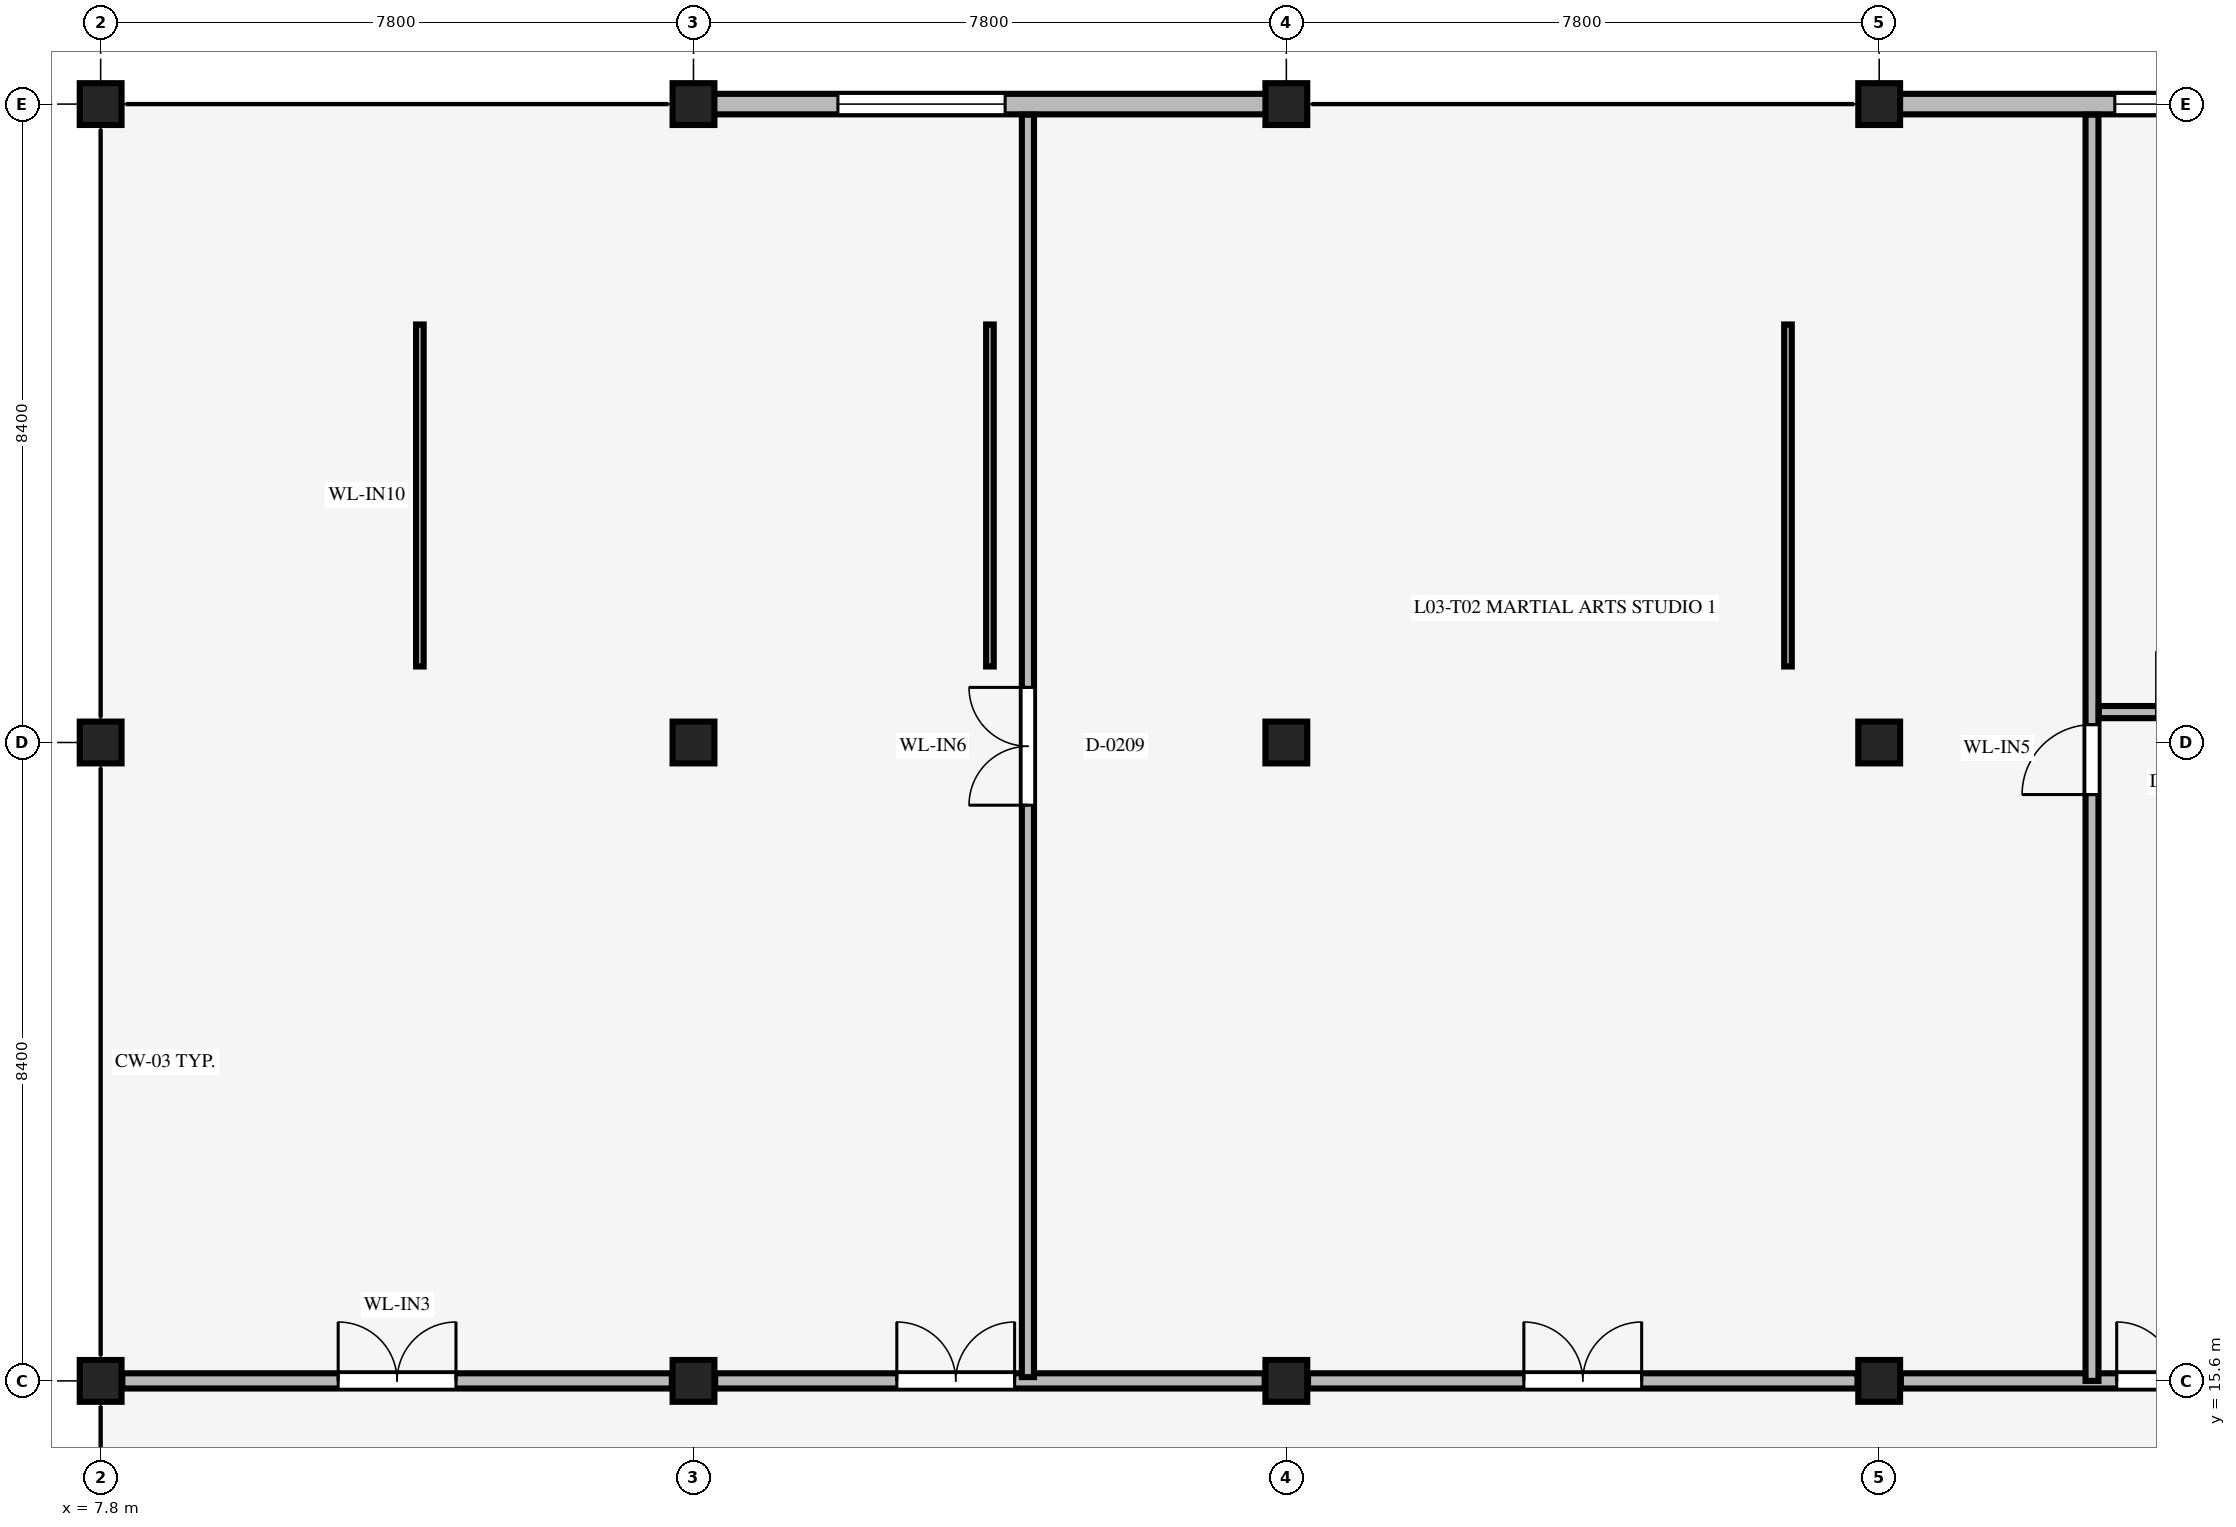
"""IFC4 building model, lengths in metres.
Left out: names, types, materials, properties, quantities, classifications, styles, units other than length and angle.
Written with IfcOpenShell. Run it as: python <this file> out.ifc"""

import sys

from ifc_helpers import new_model, si_unit, direction, frame, frame_2d, origin, origin_2d, place, context, subcontext, project, spatial, rectangle, extrude, element, fill, save


model = new_model("IFC4")
c1 = context("Model", 3, precision=1e-05, world=origin(), true_north=direction((0.0, 1.0)))
c2 = subcontext(c1, "Body", "Model", "MODEL_VIEW")
j1 = project(units=[si_unit("LENGTHUNIT", "METRE"), si_unit("PLANEANGLEUNIT", "RADIAN")], contexts=[c1])
p1 = place(None, origin())
s1 = spatial("IfcSite", under=j1, at=p1, CompositionType="ELEMENT")
p2 = place(p1, origin())
s2 = spatial("IfcBuilding", under=s1, at=p2, CompositionType="ELEMENT")
p3 = place(p2, frame((0.0, 0.0, 15.9)))
s3 = spatial("IfcBuildingStorey", under=s2, at=p3, CompositionType="ELEMENT", Elevation=15.9)
for number, where, z_axis, x_axis in (
    (1, (7.8, 15.6, 0.0), (0.0, 0.0, 1.0), (1.0, 0.0, 0.0)),
    (2, (7.8, 24.0, 0.0), (0.0, 0.0, 1.0), (1.0, 0.0, 0.0)),
    (3, (7.8, 32.4, 0.0), (0.0, 0.0, 1.0), (1.0, 0.0, 0.0)),
    (4, (15.6, 15.6, 0.0), (0.0, 0.0, 1.0), (1.0, 0.0, 0.0)),
    (5, (15.6, 24.0, 0.0), (0.0, 0.0, 1.0), (1.0, 0.0, 0.0)),
    (6, (15.6, 32.4, 0.0), (0.0, 0.0, 1.0), (1.0, 0.0, 0.0)),
    (7, (23.4, 15.6, 0.0), (0.0, 0.0, 1.0), (1.0, 0.0, 0.0)),
    (8, (23.4, 24.0, 0.0), (0.0, 0.0, 1.0), (1.0, 0.0, 0.0)),
    (9, (23.4, 32.4, 0.0), (0.0, 0.0, 1.0), (1.0, 0.0, 0.0)),
    (10, (31.2, 15.6, 0.0), (0.0, 0.0, 1.0), (1.0, 0.0, 0.0)),
    (11, (31.2, 24.0, 0.0), (0.0, 0.0, 1.0), (1.0, 0.0, 0.0)),
    (12, (31.2, 32.4, 0.0), (0.0, 0.0, 1.0), (1.0, 0.0, 0.0)),
):
    element("IfcColumn", number, at=place(p3, frame(where, z_axis=z_axis, x_axis=x_axis)), inside=s3, PredefinedType="COLUMN", context=c2, shape_type="SweptSolid", body=[
        extrude(rectangle(XDim=0.55, YDim=0.55, at=origin_2d()), origin(), (0.0, 0.0, 1.0), 3.9),
    ])
p4 = place(p3, frame((15.865, 32.4, 0.0), z_axis=(0.0, 0.0, 1.0), x_axis=(1.0, 0.0, 0.0)))
e13 = element("IfcWall", 13, at=p4, inside=s3, PredefinedType="STANDARD", context=c2, shape_type="SweptSolid", body=[
    extrude(rectangle(XDim=7.27, YDim=0.27, at=frame_2d((3.635, 0.0))), origin(), (0.0, 0.0, 1.0), 3.271),
])
p5 = place(p4, frame((1.635, 0.0, 0.95)))
e14 = element("IfcOpeningElement", 14, at=p5, cuts=e13, PredefinedType="OPENING", context=c2, shape_type="SweptSolid", body=[
    extrude(rectangle(XDim=2.2, YDim=1.9, at=frame_2d((1.1, 0.95))), frame((0.0, 0.145, 0.0), z_axis=(0.0, -1.0, 0.0), x_axis=(1.0, 0.0, 0.0)), (0.0, 0.0, 1.0), 0.29),
])
p6 = place(p3, frame((31.465, 32.4, 0.0), z_axis=(0.0, 0.0, 1.0), x_axis=(1.0, 0.0, 0.0)))
e15 = element("IfcWall", 15, at=p6, inside=s3, PredefinedType="STANDARD", context=c2, shape_type="SweptSolid", body=[
    extrude(rectangle(XDim=7.27, YDim=0.27, at=frame_2d((3.635, 0.0))), origin(), (0.0, 0.0, 1.0), 3.271),
])
p7 = place(p6, frame((2.835, 0.0, 0.95)))
e16 = element("IfcOpeningElement", 16, at=p7, cuts=e15, PredefinedType="OPENING", context=c2, shape_type="SweptSolid", body=[
    extrude(rectangle(XDim=2.2, YDim=1.9, at=frame_2d((1.1, 0.95))), frame((0.0, 0.145, 0.0), z_axis=(0.0, -1.0, 0.0), x_axis=(1.0, 0.0, 0.0)), (0.0, 0.0, 1.0), 0.29),
])
p8 = place(p3, frame((8.085, 15.6, 0.0), z_axis=(0.0, 0.0, 1.0), x_axis=(1.0, 0.0, 0.0)))
e17 = element("IfcWall", 17, at=p8, inside=s3, PredefinedType="STANDARD", context=c2, shape_type="SweptSolid", body=[
    extrude(rectangle(XDim=7.23, YDim=0.2, at=frame_2d((3.615, 0.0))), origin(), (0.0, 0.0, 1.0), 2.9),
])
p9 = place(p8, frame((2.84, 0.0, 0.0)))
e18 = element("IfcOpeningElement", 18, at=p9, cuts=e17, PredefinedType="OPENING", context=c2, shape_type="SweptSolid", body=[
    extrude(rectangle(XDim=1.55, YDim=2.25, at=frame_2d((0.775, 1.125))), frame((0.0, 0.11, 0.0), z_axis=(0.0, -1.0, 0.0), x_axis=(1.0, 0.0, 0.0)), (0.0, 0.0, 1.0), 0.22),
])
p10 = place(p3, frame((15.885, 15.6, 0.0), z_axis=(0.0, 0.0, 1.0), x_axis=(1.0, 0.0, 0.0)))
e19 = element("IfcWall", 19, at=p10, inside=s3, PredefinedType="STANDARD", context=c2, shape_type="SweptSolid", body=[
    extrude(rectangle(XDim=7.23, YDim=0.2, at=frame_2d((3.615, 0.0))), origin(), (0.0, 0.0, 1.0), 2.9),
])
p11 = place(p10, frame((2.39, 0.0, 0.0)))
e20 = element("IfcOpeningElement", 20, at=p11, cuts=e19, PredefinedType="OPENING", context=c2, shape_type="SweptSolid", body=[
    extrude(rectangle(XDim=1.55, YDim=2.25, at=frame_2d((0.775, 1.125))), frame((0.0, 0.11, 0.0), z_axis=(0.0, -1.0, 0.0), x_axis=(1.0, 0.0, 0.0)), (0.0, 0.0, 1.0), 0.22),
])
p12 = place(p3, frame((23.685, 15.6, 0.0), z_axis=(0.0, 0.0, 1.0), x_axis=(1.0, 0.0, 0.0)))
e21 = element("IfcWall", 21, at=p12, inside=s3, PredefinedType="STANDARD", context=c2, shape_type="SweptSolid", body=[
    extrude(rectangle(XDim=7.23, YDim=0.2, at=frame_2d((3.615, 0.0))), origin(), (0.0, 0.0, 1.0), 2.9),
])
p13 = place(p12, frame((2.84, 0.0, 0.0)))
e22 = element("IfcOpeningElement", 22, at=p13, cuts=e21, PredefinedType="OPENING", context=c2, shape_type="SweptSolid", body=[
    extrude(rectangle(XDim=1.55, YDim=2.25, at=frame_2d((0.775, 1.125))), frame((0.0, 0.11, 0.0), z_axis=(0.0, -1.0, 0.0), x_axis=(1.0, 0.0, 0.0)), (0.0, 0.0, 1.0), 0.22),
])
p14 = place(p3, frame((31.485, 15.6, 0.0), z_axis=(0.0, 0.0, 1.0), x_axis=(1.0, 0.0, 0.0)))
e23 = element("IfcWall", 23, at=p14, inside=s3, PredefinedType="STANDARD", context=c2, shape_type="SweptSolid", body=[
    extrude(rectangle(XDim=7.23, YDim=0.2, at=frame_2d((3.615, 0.0))), origin(), (0.0, 0.0, 1.0), 2.9),
])
p15 = place(p14, frame((2.84, 0.0, 0.0)))
e24 = element("IfcOpeningElement", 24, at=p15, cuts=e23, PredefinedType="OPENING", context=c2, shape_type="SweptSolid", body=[
    extrude(rectangle(XDim=1.55, YDim=2.25, at=frame_2d((0.775, 1.125))), frame((0.0, 0.11, 0.0), z_axis=(0.0, -1.0, 0.0), x_axis=(1.0, 0.0, 0.0)), (0.0, 0.0, 1.0), 0.22),
])
p16 = place(p3, frame((34.0, 15.6, 0.0), z_axis=(0.0, 0.0, 1.0), x_axis=(0.0, 1.0, 0.0)))
e25 = element("IfcWall", 25, at=p16, inside=s3, PredefinedType="STANDARD", context=c2, shape_type="SweptSolid", body=[
    extrude(rectangle(XDim=16.66, YDim=0.17, at=frame_2d((8.33, 0.0))), origin(), (0.0, 0.0, 1.0), 2.9),
])
p17 = place(p16, frame((7.715, 0.0, 0.0)))
e26 = element("IfcOpeningElement", 26, at=p17, cuts=e25, PredefinedType="OPENING", context=c2, shape_type="SweptSolid", body=[
    extrude(rectangle(XDim=0.92, YDim=2.15, at=frame_2d((0.46, 1.075))), frame((0.0, 0.095, 0.0), z_axis=(0.0, -1.0, 0.0), x_axis=(1.0, 0.0, 0.0)), (0.0, 0.0, 1.0), 0.19),
])
p18 = place(p3, frame((20.0, 15.65, 0.0), z_axis=(0.0, 0.0, 1.0), x_axis=(0.0, 1.0, 0.0)))
e27 = element("IfcWall", 27, at=p18, inside=s3, PredefinedType="STANDARD", context=c2, shape_type="SweptSolid", body=[
    extrude(rectangle(XDim=16.61, YDim=0.16, at=frame_2d((8.305, 0.0))), origin(), (0.0, 0.0, 1.0), 2.9),
])
p19 = place(p18, frame((7.525, 0.0, 0.0)))
e28 = element("IfcOpeningElement", 28, at=p19, cuts=e27, PredefinedType="OPENING", context=c2, shape_type="SweptSolid", body=[
    extrude(rectangle(XDim=1.55, YDim=2.25, at=frame_2d((0.775, 1.125))), frame((0.0, 0.09, 0.0), z_axis=(0.0, -1.0, 0.0), x_axis=(1.0, 0.0, 0.0)), (0.0, 0.0, 1.0), 0.18),
])
for number, where, z_axis, x_axis in (
    (29, (12.0, 25.0, 0.0), (0.0, 0.0, 1.0), (0.0, 1.0, 0.0)),
    (30, (19.5, 25.0, 0.0), (0.0, 0.0, 1.0), (0.0, 1.0, 0.0)),
    (31, (30.0, 25.0, 0.0), (0.0, 0.0, 1.0), (0.0, 1.0, 0.0)),
):
    element("IfcWall", number, at=place(p3, frame(where, z_axis=z_axis, x_axis=x_axis)), inside=s3, PredefinedType="STANDARD", context=c2, shape_type="SweptSolid", body=[
        extrude(rectangle(XDim=4.5, YDim=0.1, at=frame_2d((2.25, 0.0))), origin(), (0.0, 0.0, 1.0), 2.9),
    ])
p20 = place(p3, frame((34.09, 24.4, 0.0), z_axis=(0.0, 0.0, 1.0), x_axis=(1.0, 0.0, 0.0)))
e32 = element("IfcWall", 32, at=p20, inside=s3, PredefinedType="STANDARD", context=c2, shape_type="SweptSolid", body=[
    extrude(rectangle(XDim=23.91, YDim=0.16, at=frame_2d((11.955, 0.0))), origin(), (0.0, 0.0, 1.0), 2.9),
])
p21 = place(p20, frame((0.76, 0.0, 0.0)))
e33 = element("IfcOpeningElement", 33, at=p21, cuts=e32, PredefinedType="OPENING", context=c2, shape_type="SweptSolid", body=[
    extrude(rectangle(XDim=1.6, YDim=2.3, at=frame_2d((0.8, 1.15))), frame((0.0, 0.09, 0.0), z_axis=(0.0, -1.0, 0.0), x_axis=(1.0, 0.0, 0.0)), (0.0, 0.0, 1.0), 0.18),
])
p22 = place(p20, frame((2.81, 0.0, 0.9)))
e34 = element("IfcOpeningElement", 34, at=p22, cuts=e32, PredefinedType="OPENING", context=c2, shape_type="SweptSolid", body=[
    extrude(rectangle(XDim=2.2, YDim=1.8, at=frame_2d((1.1, 0.9))), frame((0.0, 0.09, 0.0), z_axis=(0.0, -1.0, 0.0), x_axis=(1.0, 0.0, 0.0)), (0.0, 0.0, 1.0), 0.18),
])
p23 = place(p5, origin())
e35 = element("IfcWindow", 35, at=p23, inside=s3, PartitioningType="SINGLE_PANEL", PredefinedType="WINDOW", context=c2, shape_type="SweptSolid", body=[
    extrude(rectangle(XDim=2.2, YDim=1.9, at=frame_2d((1.1, 0.95))), frame((0.0, 0.03, 0.0), z_axis=(0.0, -1.0, 0.0), x_axis=(1.0, 0.0, 0.0)), (0.0, 0.0, 1.0), 0.06),
])
fill(e14, e35)
p24 = place(p7, origin())
e36 = element("IfcWindow", 36, at=p24, inside=s3, PartitioningType="SINGLE_PANEL", PredefinedType="WINDOW", context=c2, shape_type="SweptSolid", body=[
    extrude(rectangle(XDim=2.2, YDim=1.9, at=frame_2d((1.1, 0.95))), frame((0.0, 0.03, 0.0), z_axis=(0.0, -1.0, 0.0), x_axis=(1.0, 0.0, 0.0)), (0.0, 0.0, 1.0), 0.06),
])
fill(e16, e36)
p25 = place(p9, origin())
e37 = element("IfcDoor", 37, at=p25, inside=s3, OperationType="DOUBLE_DOOR_SINGLE_SWING", PredefinedType="DOOR", context=c2, shape_type="SweptSolid", body=[
    extrude(rectangle(XDim=1.55, YDim=2.25, at=frame_2d((0.775, 1.125))), frame((0.0, 0.025, 0.0), z_axis=(0.0, -1.0, 0.0), x_axis=(1.0, 0.0, 0.0)), (0.0, 0.0, 1.0), 0.05),
])
fill(e18, e37)
p26 = place(p11, origin())
e38 = element("IfcDoor", 38, at=p26, inside=s3, OperationType="DOUBLE_DOOR_SINGLE_SWING", PredefinedType="DOOR", context=c2, shape_type="SweptSolid", body=[
    extrude(rectangle(XDim=1.55, YDim=2.25, at=frame_2d((0.775, 1.125))), frame((0.0, 0.025, 0.0), z_axis=(0.0, -1.0, 0.0), x_axis=(1.0, 0.0, 0.0)), (0.0, 0.0, 1.0), 0.05),
])
fill(e20, e38)
p27 = place(p13, origin())
e39 = element("IfcDoor", 39, at=p27, inside=s3, OperationType="DOUBLE_DOOR_SINGLE_SWING", PredefinedType="DOOR", context=c2, shape_type="SweptSolid", body=[
    extrude(rectangle(XDim=1.55, YDim=2.25, at=frame_2d((0.775, 1.125))), frame((0.0, 0.025, 0.0), z_axis=(0.0, -1.0, 0.0), x_axis=(1.0, 0.0, 0.0)), (0.0, 0.0, 1.0), 0.05),
])
fill(e22, e39)
p28 = place(p15, origin())
e40 = element("IfcDoor", 40, at=p28, inside=s3, OperationType="DOUBLE_DOOR_SINGLE_SWING", PredefinedType="DOOR", context=c2, shape_type="SweptSolid", body=[
    extrude(rectangle(XDim=1.55, YDim=2.25, at=frame_2d((0.775, 1.125))), frame((0.0, 0.025, 0.0), z_axis=(0.0, -1.0, 0.0), x_axis=(1.0, 0.0, 0.0)), (0.0, 0.0, 1.0), 0.05),
])
fill(e24, e40)
p29 = place(p17, origin())
e41 = element("IfcDoor", 41, at=p29, inside=s3, OperationType="SINGLE_SWING_LEFT", PredefinedType="DOOR", context=c2, shape_type="SweptSolid", body=[
    extrude(rectangle(XDim=0.92, YDim=2.15, at=frame_2d((0.46, 1.075))), frame((0.0, 0.025, 0.0), z_axis=(0.0, -1.0, 0.0), x_axis=(1.0, 0.0, 0.0)), (0.0, 0.0, 1.0), 0.05),
])
fill(e26, e41)
p30 = place(p19, origin())
e42 = element("IfcDoor", 42, at=p30, inside=s3, OperationType="DOUBLE_DOOR_SINGLE_SWING", PredefinedType="DOOR", context=c2, shape_type="SweptSolid", body=[
    extrude(rectangle(XDim=1.55, YDim=2.25, at=frame_2d((0.775, 1.125))), frame((0.0, 0.025, 0.0), z_axis=(0.0, -1.0, 0.0), x_axis=(1.0, 0.0, 0.0)), (0.0, 0.0, 1.0), 0.05),
])
fill(e28, e42)
save(model, sys.argv[1])
